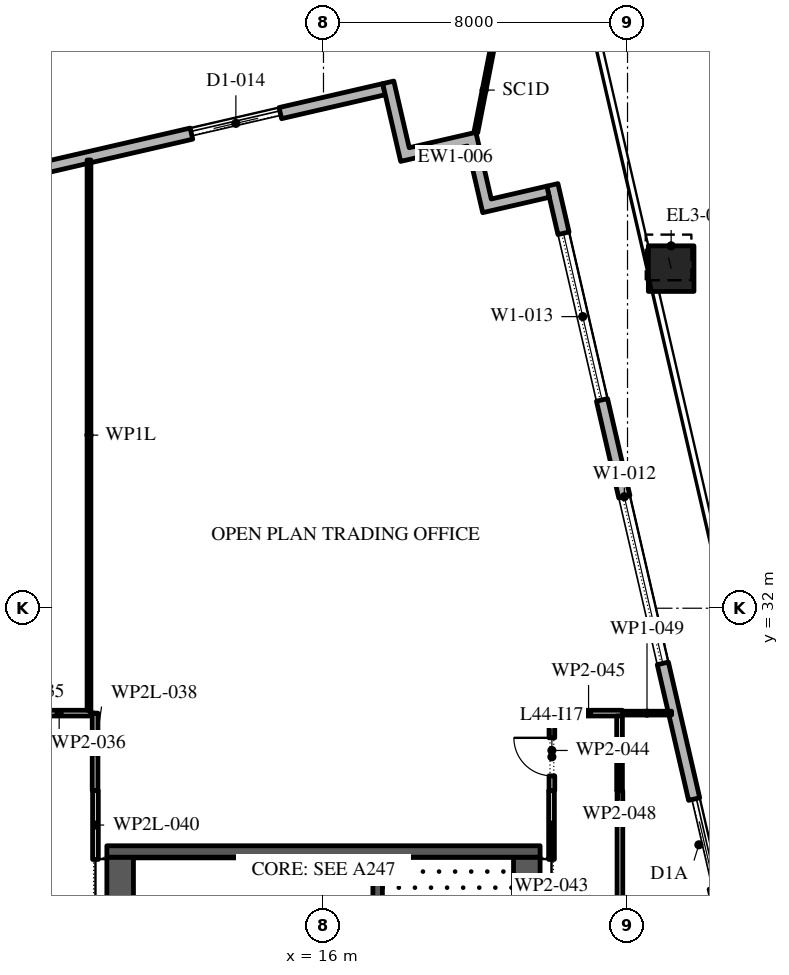
"""IFC4 building model, lengths in metres.
Left out: names, types, materials, properties, quantities, classifications, styles, units other than length and angle.
Written with IfcOpenShell. Run it as: python <this file> out.ifc"""

import sys

from ifc_helpers import new_model, si_unit, direction, frame, frame_2d, origin, origin_2d, place, context, subcontext, project, spatial, polyline, rectangle, outline, extrude, element, fill, save


model = new_model("IFC4")
c1 = context("Model", 3, precision=1e-05, world=origin(), true_north=direction((0.0, 1.0)))
c2 = subcontext(c1, "Body", "Model", "MODEL_VIEW")
j1 = project(units=[si_unit("LENGTHUNIT", "METRE"), si_unit("PLANEANGLEUNIT", "RADIAN")], contexts=[c1])
p1 = place(None, origin())
s1 = spatial("IfcSite", under=j1, at=p1, CompositionType="ELEMENT")
p2 = place(p1, origin())
s2 = spatial("IfcBuilding", under=s1, at=p2, CompositionType="ELEMENT")
p3 = place(p2, frame((0.0, 0.0, 201.0)))
s3 = spatial("IfcBuildingStorey", under=s2, at=p3, CompositionType="ELEMENT", Elevation=201.0)
p4 = place(p3, frame((25.148, 40.936, 0.0), z_axis=(-0.016176212764, 0.069980963462, 0.99741716192), x_axis=(-0.974309502923, -0.225213215672, 0.0)))
e1 = element("IfcColumn", 1, at=p4, inside=s3, PredefinedType="COLUMN", context=c2, shape_type="SweptSolid", body=[
    extrude(rectangle(XDim=1.2, YDim=1.2, at=origin_2d()), origin(), (0.0, 0.0, 1.0), 4.211),
])
p5 = place(p3, frame((33.157, -5.092, 0.0), z_axis=(0.0, 0.0, 1.0), x_axis=(-0.224950279389, 0.974370243697, 0.0)))
e2 = element("IfcWall", 2, at=p5, inside=s3, PredefinedType="STANDARD", context=c2, shape_type="SweptSolid", body=[
    extrude(rectangle(XDim=49.5, YDim=0.3, at=frame_2d((24.75, 0.0))), origin(), (0.0, 0.0, 1.0), 4.0),
])
p6 = place(p5, frame((2.207, 0.0, 0.0)))
e3 = element("IfcOpeningElement", 3, at=p6, cuts=e2, PredefinedType="OPENING", context=c2, shape_type="SweptSolid", body=[
    extrude(rectangle(XDim=2.4, YDim=3.125, at=frame_2d((1.2, 1.562))), frame((0.0, 0.16, 0.0), z_axis=(0.0, -1.0, 0.0), x_axis=(1.0, 0.0, 0.0)), (0.0, 0.0, 1.0), 0.32),
])
p7 = place(p5, frame((8.121, 0.0, 0.45)))
e4 = element("IfcOpeningElement", 4, at=p7, cuts=e2, PredefinedType="OPENING", context=c2, shape_type="SweptSolid", body=[
    extrude(rectangle(XDim=4.5, YDim=2.875, at=frame_2d((2.25, 1.438))), frame((0.0, 0.16, 0.0), z_axis=(0.0, -1.0, 0.0), x_axis=(1.0, 0.0, 0.0)), (0.0, 0.0, 1.0), 0.32),
])
p8 = place(p5, frame((15.236, 0.0, 0.45)))
e5 = element("IfcOpeningElement", 5, at=p8, cuts=e2, PredefinedType="OPENING", context=c2, shape_type="SweptSolid", body=[
    extrude(rectangle(XDim=4.5, YDim=2.875, at=frame_2d((2.25, 1.438))), frame((0.0, 0.16, 0.0), z_axis=(0.0, -1.0, 0.0), x_axis=(1.0, 0.0, 0.0)), (0.0, 0.0, 1.0), 0.32),
])
p9 = place(p5, frame((22.35, 0.0, 0.45)))
e6 = element("IfcOpeningElement", 6, at=p9, cuts=e2, PredefinedType="OPENING", context=c2, shape_type="SweptSolid", body=[
    extrude(rectangle(XDim=4.5, YDim=3.0, at=frame_2d((2.25, 1.5))), frame((0.0, 0.16, 0.0), z_axis=(0.0, -1.0, 0.0), x_axis=(1.0, 0.0, 0.0)), (0.0, 0.0, 1.0), 0.32),
])
p10 = place(p5, frame((30.514, 0.0, 0.0)))
e7 = element("IfcOpeningElement", 7, at=p10, cuts=e2, PredefinedType="OPENING", context=c2, shape_type="SweptSolid", body=[
    extrude(rectangle(XDim=2.4, YDim=3.45, at=frame_2d((1.2, 1.725))), frame((0.0, 0.16, 0.0), z_axis=(0.0, -1.0, 0.0), x_axis=(1.0, 0.0, 0.0)), (0.0, 0.0, 1.0), 0.32),
])
p11 = place(p5, frame((36.579, 0.0, 0.45)))
e8 = element("IfcOpeningElement", 8, at=p11, cuts=e2, PredefinedType="OPENING", context=c2, shape_type="SweptSolid", body=[
    extrude(rectangle(XDim=4.5, YDim=3.05, at=frame_2d((2.25, 1.525))), frame((0.0, 0.16, 0.0), z_axis=(0.0, -1.0, 0.0), x_axis=(1.0, 0.0, 0.0)), (0.0, 0.0, 1.0), 0.32),
])
p12 = place(p5, frame((43.693, 0.0, 0.45)))
e9 = element("IfcOpeningElement", 9, at=p12, cuts=e2, PredefinedType="OPENING", context=c2, shape_type="SweptSolid", body=[
    extrude(rectangle(XDim=4.5, YDim=3.05, at=frame_2d((2.25, 1.525))), frame((0.0, 0.16, 0.0), z_axis=(0.0, -1.0, 0.0), x_axis=(1.0, 0.0, 0.0)), (0.0, 0.0, 1.0), 0.32),
])
p13 = place(p3, frame((17.592, 45.657, 0.0), z_axis=(0.0, 0.0, 1.0), x_axis=(-0.974370243697, -0.224950279389, 0.0)))
e10 = element("IfcWall", 10, at=p13, inside=s3, PredefinedType="STANDARD", context=c2, shape_type="SweptSolid", body=[
    extrude(rectangle(XDim=49.5, YDim=0.3, at=frame_2d((24.75, 0.0))), origin(), (0.0, 0.0, 1.0), 4.0),
])
p14 = place(p13, frame((2.8, 0.0, 0.0)))
e11 = element("IfcOpeningElement", 11, at=p14, cuts=e10, PredefinedType="OPENING", context=c2, shape_type="SweptSolid", body=[
    extrude(rectangle(XDim=2.4, YDim=3.5, at=frame_2d((1.2, 1.75))), frame((0.0, 0.16, 0.0), z_axis=(0.0, -1.0, 0.0), x_axis=(1.0, 0.0, 0.0)), (0.0, 0.0, 1.0), 0.32),
])
p15 = place(p13, frame((9.9, 0.0, 0.45)))
e12 = element("IfcOpeningElement", 12, at=p15, cuts=e10, PredefinedType="OPENING", context=c2, shape_type="SweptSolid", body=[
    extrude(rectangle(XDim=4.5, YDim=2.45, at=frame_2d((2.25, 1.225))), frame((0.0, 0.16, 0.0), z_axis=(0.0, -1.0, 0.0), x_axis=(1.0, 0.0, 0.0)), (0.0, 0.0, 1.0), 0.32),
])
p16 = place(p13, frame((18.2, 0.0, 0.45)))
e13 = element("IfcOpeningElement", 13, at=p16, cuts=e10, PredefinedType="OPENING", context=c2, shape_type="SweptSolid", body=[
    extrude(rectangle(XDim=4.5, YDim=2.45, at=frame_2d((2.25, 1.225))), frame((0.0, 0.16, 0.0), z_axis=(0.0, -1.0, 0.0), x_axis=(1.0, 0.0, 0.0)), (0.0, 0.0, 1.0), 0.32),
])
p17 = place(p13, frame((26.5, 0.0, 0.45)))
e14 = element("IfcOpeningElement", 14, at=p17, cuts=e10, PredefinedType="OPENING", context=c2, shape_type="SweptSolid", body=[
    extrude(rectangle(XDim=4.5, YDim=2.5, at=frame_2d((2.25, 1.25))), frame((0.0, 0.16, 0.0), z_axis=(0.0, -1.0, 0.0), x_axis=(1.0, 0.0, 0.0)), (0.0, 0.0, 1.0), 0.32),
])
p18 = place(p13, frame((35.85, 0.0, 0.0)))
e15 = element("IfcOpeningElement", 15, at=p18, cuts=e10, PredefinedType="OPENING", context=c2, shape_type="SweptSolid", body=[
    extrude(rectangle(XDim=2.4, YDim=3.5, at=frame_2d((1.2, 1.75))), frame((0.0, 0.16, 0.0), z_axis=(0.0, -1.0, 0.0), x_axis=(1.0, 0.0, 0.0)), (0.0, 0.0, 1.0), 0.32),
])
p19 = place(p13, frame((43.1, 0.0, 0.45)))
e16 = element("IfcOpeningElement", 16, at=p19, cuts=e10, PredefinedType="OPENING", context=c2, shape_type="SweptSolid", body=[
    extrude(rectangle(XDim=4.5, YDim=2.675, at=frame_2d((2.25, 1.337))), frame((0.0, 0.16, 0.0), z_axis=(0.0, -1.0, 0.0), x_axis=(1.0, 0.0, 0.0)), (0.0, 0.0, 1.0), 0.32),
])
p20 = place(p3, origin())
e17 = element("IfcWall", 17, at=p20, inside=s3, PredefinedType="STANDARD", context=c2, shape_type="SweptSolid", body=[
    extrude(outline(polyline([(19.785, 44.162), (18.031, 43.757), (17.558, 45.803), (17.851, 45.871), (18.256, 44.117), (20.01, 44.522), (20.414, 42.768), (21.876, 43.105), (21.943, 42.813), (20.19, 42.408), (19.785, 44.162)])), origin(), (0.0, 0.0, 1.0), 4.0),
])
p21 = place(p3, frame((20.01, 44.522, -0.05), z_axis=(0.0, 0.0, 1.0), x_axis=(0.191885207639, 0.981417376598, 0.0)))
e18 = element("IfcWall", 18, at=p21, inside=s3, PredefinedType="STANDARD", context=c2, shape_type="SweptSolid", body=[
    extrude(rectangle(XDim=2.265, YDim=0.1, at=frame_2d((1.132, 0.0))), origin(), (0.0, 0.0, 1.0), 3.07),
])
p22 = place(p3, frame((21.35, -2.45, 0.0), z_axis=(0.0, 0.0, 1.0), x_axis=(0.0, 1.0, 0.0)))
e19 = element("IfcWall", 19, at=p22, inside=s3, PredefinedType="SHEAR", context=c2, shape_type="SweptSolid", body=[
    extrude(rectangle(XDim=27.9, YDim=0.7, at=frame_2d((13.95, 0.0))), origin(), (0.0, 0.0, 1.0), 4.0),
])
p23 = place(p22, frame((5.05, 0.0, 0.0)))
e20 = element("IfcOpeningElement", 20, at=p23, cuts=e19, PredefinedType="OPENING", context=c2, shape_type="SweptSolid", body=[
    extrude(rectangle(XDim=1.2, YDim=2.1, at=frame_2d((0.6, 1.05))), frame((0.0, 0.36, 0.0), z_axis=(0.0, -1.0, 0.0), x_axis=(1.0, 0.0, 0.0)), (0.0, 0.0, 1.0), 0.72),
])
p24 = place(p22, frame((21.65, 0.0, 0.0)))
e21 = element("IfcOpeningElement", 21, at=p24, cuts=e19, PredefinedType="OPENING", context=c2, shape_type="SweptSolid", body=[
    extrude(rectangle(XDim=1.2, YDim=2.1, at=frame_2d((0.6, 1.05))), frame((0.0, 0.36, 0.0), z_axis=(0.0, -1.0, 0.0), x_axis=(1.0, 0.0, 0.0)), (0.0, 0.0, 1.0), 0.72),
])
p25 = place(p3, frame((10.65, -2.45, 0.0), z_axis=(0.0, 0.0, 1.0), x_axis=(0.0, 1.0, 0.0)))
e22 = element("IfcWall", 22, at=p25, inside=s3, PredefinedType="SHEAR", context=c2, shape_type="SweptSolid", body=[
    extrude(rectangle(XDim=27.9, YDim=0.7, at=frame_2d((13.95, 0.0))), origin(), (0.0, 0.0, 1.0), 4.0),
])
p26 = place(p25, frame((23.65, 0.0, 0.0)))
e23 = element("IfcOpeningElement", 23, at=p26, cuts=e22, PredefinedType="OPENING", context=c2, shape_type="SweptSolid", body=[
    extrude(rectangle(XDim=2.4, YDim=2.1, at=frame_2d((1.2, 1.05))), frame((0.0, 0.36, 0.0), z_axis=(0.0, -1.0, 0.0), x_axis=(1.0, 0.0, 0.0)), (0.0, 0.0, 1.0), 0.72),
])
p27 = place(p25, frame((0.788, 0.0, 0.0)))
e24 = element("IfcOpeningElement", 24, at=p27, cuts=e22, PredefinedType="OPENING", context=c2, shape_type="SweptSolid", body=[
    extrude(rectangle(XDim=0.9, YDim=2.1, at=frame_2d((0.45, 1.05))), frame((0.0, 0.36, 0.0), z_axis=(0.0, -1.0, 0.0), x_axis=(1.0, 0.0, 0.0)), (0.0, 0.0, 1.0), 0.72),
])
p28 = place(p25, frame((3.962, 0.0, 0.0)))
e25 = element("IfcOpeningElement", 25, at=p28, cuts=e22, PredefinedType="OPENING", context=c2, shape_type="SweptSolid", body=[
    extrude(rectangle(XDim=1.0, YDim=2.1, at=frame_2d((0.5, 1.05))), frame((0.0, 0.36, 0.0), z_axis=(0.0, -1.0, 0.0), x_axis=(1.0, 0.0, 0.0)), (0.0, 0.0, 1.0), 0.72),
])
p29 = place(p3, frame((10.3, 25.6, 0.0), z_axis=(0.0, 0.0, 1.0), x_axis=(1.0, 0.0, 0.0)))
e26 = element("IfcWall", 26, at=p29, inside=s3, PredefinedType="SHEAR", context=c2, shape_type="SweptSolid", body=[
    extrude(rectangle(XDim=11.4, YDim=0.3, at=frame_2d((5.7, 0.0))), origin(), (0.0, 0.0, 1.0), 4.0),
])
p30 = place(p3, frame((17.425, 19.15, 0.0), z_axis=(0.0, 0.0, 1.0), x_axis=(0.0, 1.0, 0.0)))
e27 = element("IfcWall", 27, at=p30, inside=s3, PredefinedType="SHEAR", context=c2, shape_type="SweptSolid", body=[
    extrude(rectangle(XDim=6.3, YDim=0.25, at=frame_2d((3.15, 0.0))), origin(), (0.0, 0.0, 1.0), 4.0),
])
p31 = place(p30, frame((0.05, 0.0, 0.0)))
e28 = element("IfcOpeningElement", 28, at=p31, cuts=e27, PredefinedType="OPENING", context=c2, shape_type="SweptSolid", body=[
    extrude(rectangle(XDim=1.2, YDim=2.1, at=frame_2d((0.6, 1.05))), frame((0.0, 0.135, 0.0), z_axis=(0.0, -1.0, 0.0), x_axis=(1.0, 0.0, 0.0)), (0.0, 0.0, 1.0), 0.27),
])
p32 = place(p3, frame((8.21, 29.24, 0.0), z_axis=(0.0, 0.0, 1.0), x_axis=(1.0, 0.0, 0.0)))
e29 = element("IfcWall", 29, at=p32, inside=s3, PredefinedType="PARTITIONING", context=c2, shape_type="SweptSolid", body=[
    extrude(rectangle(XDim=1.67, YDim=0.15, at=frame_2d((0.835, 0.0))), origin(), (0.0, 0.0, 1.0), 4.0),
])
p33 = place(p3, frame((9.83, 43.794, 0.0), z_axis=(0.0, 0.0, 1.0), x_axis=(0.0, -1.0, 0.0)))
e30 = element("IfcWall", 30, at=p33, inside=s3, PredefinedType="PARTITIONING", context=c2, shape_type="SweptSolid", body=[
    extrude(rectangle(XDim=14.479, YDim=0.1, at=frame_2d((7.24, 0.0))), origin(), (0.0, 0.0, 1.0), 3.02),
])
p34 = place(p3, frame((9.99, 29.24, 0.0), z_axis=(0.0, 0.0, 1.0), x_axis=(0.0, -1.0, 0.0)))
e31 = element("IfcWall", 31, at=p34, inside=s3, PredefinedType="PARTITIONING", context=c2, shape_type="SweptSolid", body=[
    extrude(rectangle(XDim=2.04, YDim=0.15, at=frame_2d((1.02, 0.0))), origin(), (0.0, 0.0, 1.0), 3.02),
])
p35 = place(p3, frame((10.0, 27.2, 0.0), z_axis=(0.0, 0.0, 1.0), x_axis=(0.0, -1.0, 0.0)))
e32 = element("IfcWall", 32, at=p35, inside=s3, PredefinedType="PARTITIONING", context=c2, shape_type="SweptSolid", body=[
    extrude(rectangle(XDim=1.81, YDim=0.15, at=frame_2d((0.905, 0.0))), origin(), (0.0, 0.0, 1.0), 3.02),
])
p36 = place(p3, frame((22.0, 25.39, 0.0), z_axis=(0.0, 0.0, 1.0), x_axis=(0.0, 1.0, 0.0)))
e33 = element("IfcWall", 33, at=p36, inside=s3, PredefinedType="PARTITIONING", context=c2, shape_type="SweptSolid", body=[
    extrude(rectangle(XDim=1.81, YDim=0.15, at=frame_2d((0.905, 0.0))), origin(), (0.0, 0.0, 1.0), 4.0),
])
p37 = place(p3, frame((22.01, 27.2, 0.0), z_axis=(0.0, 0.0, 1.0), x_axis=(0.0, 1.0, 0.0)))
e34 = element("IfcWall", 34, at=p37, inside=s3, PredefinedType="PARTITIONING", context=c2, shape_type="SweptSolid", body=[
    extrude(rectangle(XDim=2.115, YDim=0.15, at=frame_2d((1.058, 0.0))), origin(), (0.0, 0.0, 1.0), 4.0),
])
p38 = place(p37, frame((0.39, 0.0, 0.0)))
e35 = element("IfcOpeningElement", 35, at=p38, cuts=e34, PredefinedType="OPENING", context=c2, shape_type="SweptSolid", body=[
    extrude(rectangle(XDim=1.0, YDim=2.1, at=frame_2d((0.5, 1.05))), frame((0.0, 0.085, 0.0), z_axis=(0.0, -1.0, 0.0), x_axis=(1.0, 0.0, 0.0)), (0.0, 0.0, 1.0), 0.17),
])
p39 = place(p3, frame((22.085, 29.24, 0.0), z_axis=(0.0, 0.0, 1.0), x_axis=(1.0, 0.0, 0.0)))
e36 = element("IfcWall", 36, at=p39, inside=s3, PredefinedType="PARTITIONING", context=c2, shape_type="SweptSolid", body=[
    extrude(rectangle(XDim=1.78, YDim=0.15, at=frame_2d((0.89, 0.0))), origin(), (0.0, 0.0, 1.0), 4.0),
])
p40 = place(p3, frame((23.79, 29.165, 0.0), z_axis=(0.0, 0.0, 1.0), x_axis=(0.0, -1.0, 0.0)))
e37 = element("IfcWall", 37, at=p40, inside=s3, PredefinedType="PARTITIONING", context=c2, shape_type="SweptSolid", body=[
    extrude(rectangle(XDim=1.965, YDim=0.15, at=frame_2d((0.982, 0.0))), origin(), (0.0, 0.0, 1.0), 4.0),
])
p41 = place(p3, frame((23.865, 29.24, 0.0), z_axis=(0.0, 0.0, 1.0), x_axis=(1.0, 0.0, 0.0)))
e38 = element("IfcWall", 38, at=p41, inside=s3, PredefinedType="PARTITIONING", context=c2, shape_type="SweptSolid", body=[
    extrude(rectangle(XDim=1.295, YDim=0.1, at=frame_2d((0.647, 0.0))), origin(), (0.0, 0.0, 1.0), 4.0),
])
p42 = place(p3, frame((23.8, 27.2, 0.0), z_axis=(0.0, 0.0, 1.0), x_axis=(0.0, -1.0, 0.0)))
e39 = element("IfcWall", 39, at=p42, inside=s3, PredefinedType="PARTITIONING", context=c2, shape_type="SweptSolid", body=[
    extrude(rectangle(XDim=10.7, YDim=0.15, at=frame_2d((5.35, 0.0))), origin(), (0.0, 0.0, 1.0), 4.0),
])
p43 = place(p42, frame((6.0, 0.0, 0.0)))
e40 = element("IfcOpeningElement", 40, at=p43, cuts=e39, PredefinedType="OPENING", context=c2, shape_type="SweptSolid", body=[
    extrude(rectangle(XDim=1.0, YDim=2.1, at=frame_2d((0.5, 1.05))), frame((0.0, 0.085, 0.0), z_axis=(0.0, -1.0, 0.0), x_axis=(1.0, 0.0, 0.0)), (0.0, 0.0, 1.0), 0.17),
])
p44 = place(p10, origin())
e41 = element("IfcDoor", 41, at=p44, inside=s3, OperationType="DOUBLE_DOOR_SLIDING", PredefinedType="DOOR", context=c2, shape_type="SweptSolid", body=[
    extrude(rectangle(XDim=2.4, YDim=3.45, at=frame_2d((1.2, 1.725))), frame((0.0, 0.025, 0.0), z_axis=(0.0, -1.0, 0.0), x_axis=(1.0, 0.0, 0.0)), (0.0, 0.0, 1.0), 0.05),
])
fill(e7, e41)
p45 = place(p11, origin())
e42 = element("IfcWindow", 42, at=p45, inside=s3, PartitioningType="DOUBLE_PANEL_VERTICAL", PredefinedType="WINDOW", context=c2, shape_type="SweptSolid", body=[
    extrude(rectangle(XDim=4.5, YDim=3.05, at=frame_2d((2.25, 1.525))), frame((0.0, 0.03, 0.0), z_axis=(0.0, -1.0, 0.0), x_axis=(1.0, 0.0, 0.0)), (0.0, 0.0, 1.0), 0.06),
])
fill(e8, e42)
p46 = place(p12, origin())
e43 = element("IfcWindow", 43, at=p46, inside=s3, PartitioningType="DOUBLE_PANEL_VERTICAL", PredefinedType="WINDOW", context=c2, shape_type="SweptSolid", body=[
    extrude(rectangle(XDim=4.5, YDim=3.05, at=frame_2d((2.25, 1.525))), frame((0.0, 0.03, 0.0), z_axis=(0.0, -1.0, 0.0), x_axis=(1.0, 0.0, 0.0)), (0.0, 0.0, 1.0), 0.06),
])
fill(e9, e43)
p47 = place(p14, origin())
e44 = element("IfcDoor", 44, at=p47, inside=s3, OperationType="DOUBLE_DOOR_SLIDING", PredefinedType="DOOR", context=c2, shape_type="SweptSolid", body=[
    extrude(rectangle(XDim=2.4, YDim=3.5, at=frame_2d((1.2, 1.75))), frame((0.0, 0.025, 0.0), z_axis=(0.0, -1.0, 0.0), x_axis=(1.0, 0.0, 0.0)), (0.0, 0.0, 1.0), 0.05),
])
fill(e11, e44)
p48 = place(p38, origin())
e45 = element("IfcDoor", 45, at=p48, inside=s3, OperationType="SINGLE_SWING_LEFT", PredefinedType="DOOR", context=c2, shape_type="SweptSolid", body=[
    extrude(rectangle(XDim=1.0, YDim=2.1, at=frame_2d((0.5, 1.05))), frame((0.0, 0.025, 0.0), z_axis=(0.0, -1.0, 0.0), x_axis=(1.0, 0.0, 0.0)), (0.0, 0.0, 1.0), 0.05),
])
fill(e35, e45)
save(model, sys.argv[1])
